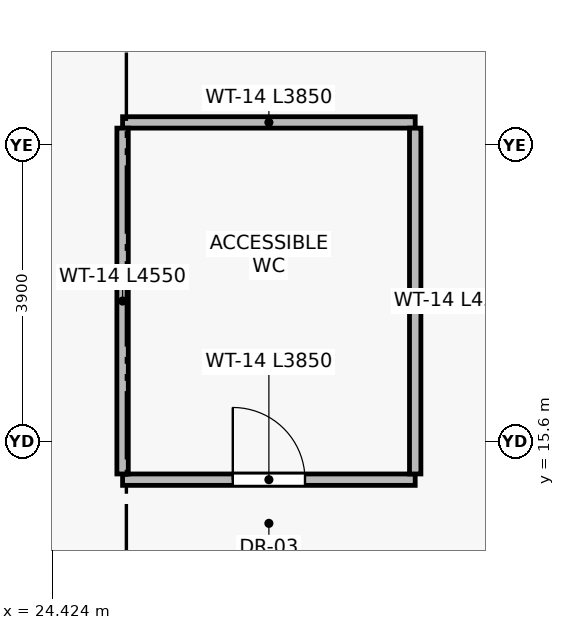
"""IFC4 building model, lengths in metres.
Left out: names, types, materials, properties, quantities, classifications, styles, units other than length and angle.
Written with IfcOpenShell. Run it as: python <this file> out.ifc"""

import sys

from ifc_helpers import new_model, si_unit, direction, frame, frame_2d, origin, place, context, subcontext, project, spatial, rectangle, extrude, element, fill, save


model = new_model("IFC4")
c1 = context("Model", 3, precision=1e-05, world=origin(), true_north=direction((0.0, 1.0)))
c2 = subcontext(c1, "Body", "Model", "MODEL_VIEW")
j1 = project(units=[si_unit("LENGTHUNIT", "METRE"), si_unit("PLANEANGLEUNIT", "RADIAN")], contexts=[c1])
p1 = place(None, origin())
s1 = spatial("IfcSite", under=j1, at=p1, CompositionType="ELEMENT")
p2 = place(p1, origin())
s2 = spatial("IfcBuilding", under=s1, at=p2, CompositionType="ELEMENT")
p3 = place(p2, frame((0.0, 0.0, -4.5)))
s3 = spatial("IfcBuildingStorey", under=s2, at=p3, CompositionType="ELEMENT", Elevation=-4.5)
p4 = place(p3, frame((25.35, 15.1, 0.0), z_axis=(0.0, 0.0, 1.0), x_axis=(1.0, 0.0, 0.0)))
e1 = element("IfcWall", 1, at=p4, inside=s3, PredefinedType="PARTITIONING", context=c2, shape_type="SweptSolid", body=[
    extrude(rectangle(XDim=3.85, YDim=0.15, at=frame_2d((1.925, 0.0))), origin(), (0.0, 0.0, 1.0), 4.2),
])
p5 = place(p4, frame((1.45, 0.0, 0.0)))
e2 = element("IfcOpeningElement", 2, at=p5, cuts=e1, PredefinedType="OPENING", context=c2, shape_type="SweptSolid", body=[
    extrude(rectangle(XDim=0.95, YDim=2.1, at=frame_2d((0.475, 1.05))), frame((0.0, 0.085, 0.0), z_axis=(0.0, -1.0, 0.0), x_axis=(1.0, 0.0, 0.0)), (0.0, 0.0, 1.0), 0.17),
])
p6 = place(p3, frame((25.35, 19.8, 0.0), z_axis=(0.0, 0.0, 1.0), x_axis=(1.0, 0.0, 0.0)))
e3 = element("IfcWall", 3, at=p6, inside=s3, PredefinedType="PARTITIONING", context=c2, shape_type="SweptSolid", body=[
    extrude(rectangle(XDim=3.85, YDim=0.15, at=frame_2d((1.925, 0.0))), origin(), (0.0, 0.0, 1.0), 4.2),
])
for number, where, z_axis, x_axis in (
    (4, (25.35, 15.175, 0.0), (0.0, 0.0, 1.0), (0.0, 1.0, 0.0)),
    (5, (29.2, 15.175, 0.0), (0.0, 0.0, 1.0), (0.0, 1.0, 0.0)),
):
    element("IfcWall", number, at=place(p3, frame(where, z_axis=z_axis, x_axis=x_axis)), inside=s3, PredefinedType="PARTITIONING", context=c2, shape_type="SweptSolid", body=[
        extrude(rectangle(XDim=4.55, YDim=0.15, at=frame_2d((2.275, 0.0))), origin(), (0.0, 0.0, 1.0), 4.2),
    ])
p7 = place(p5, origin())
e6 = element("IfcDoor", 6, at=p7, inside=s3, OperationType="SINGLE_SWING_LEFT", PredefinedType="DOOR", context=c2, shape_type="SweptSolid", body=[
    extrude(rectangle(XDim=0.95, YDim=2.1, at=frame_2d((0.475, 1.05))), frame((0.0, 0.025, 0.0), z_axis=(0.0, -1.0, 0.0), x_axis=(1.0, 0.0, 0.0)), (0.0, 0.0, 1.0), 0.05),
])
fill(e2, e6)
save(model, sys.argv[1])
